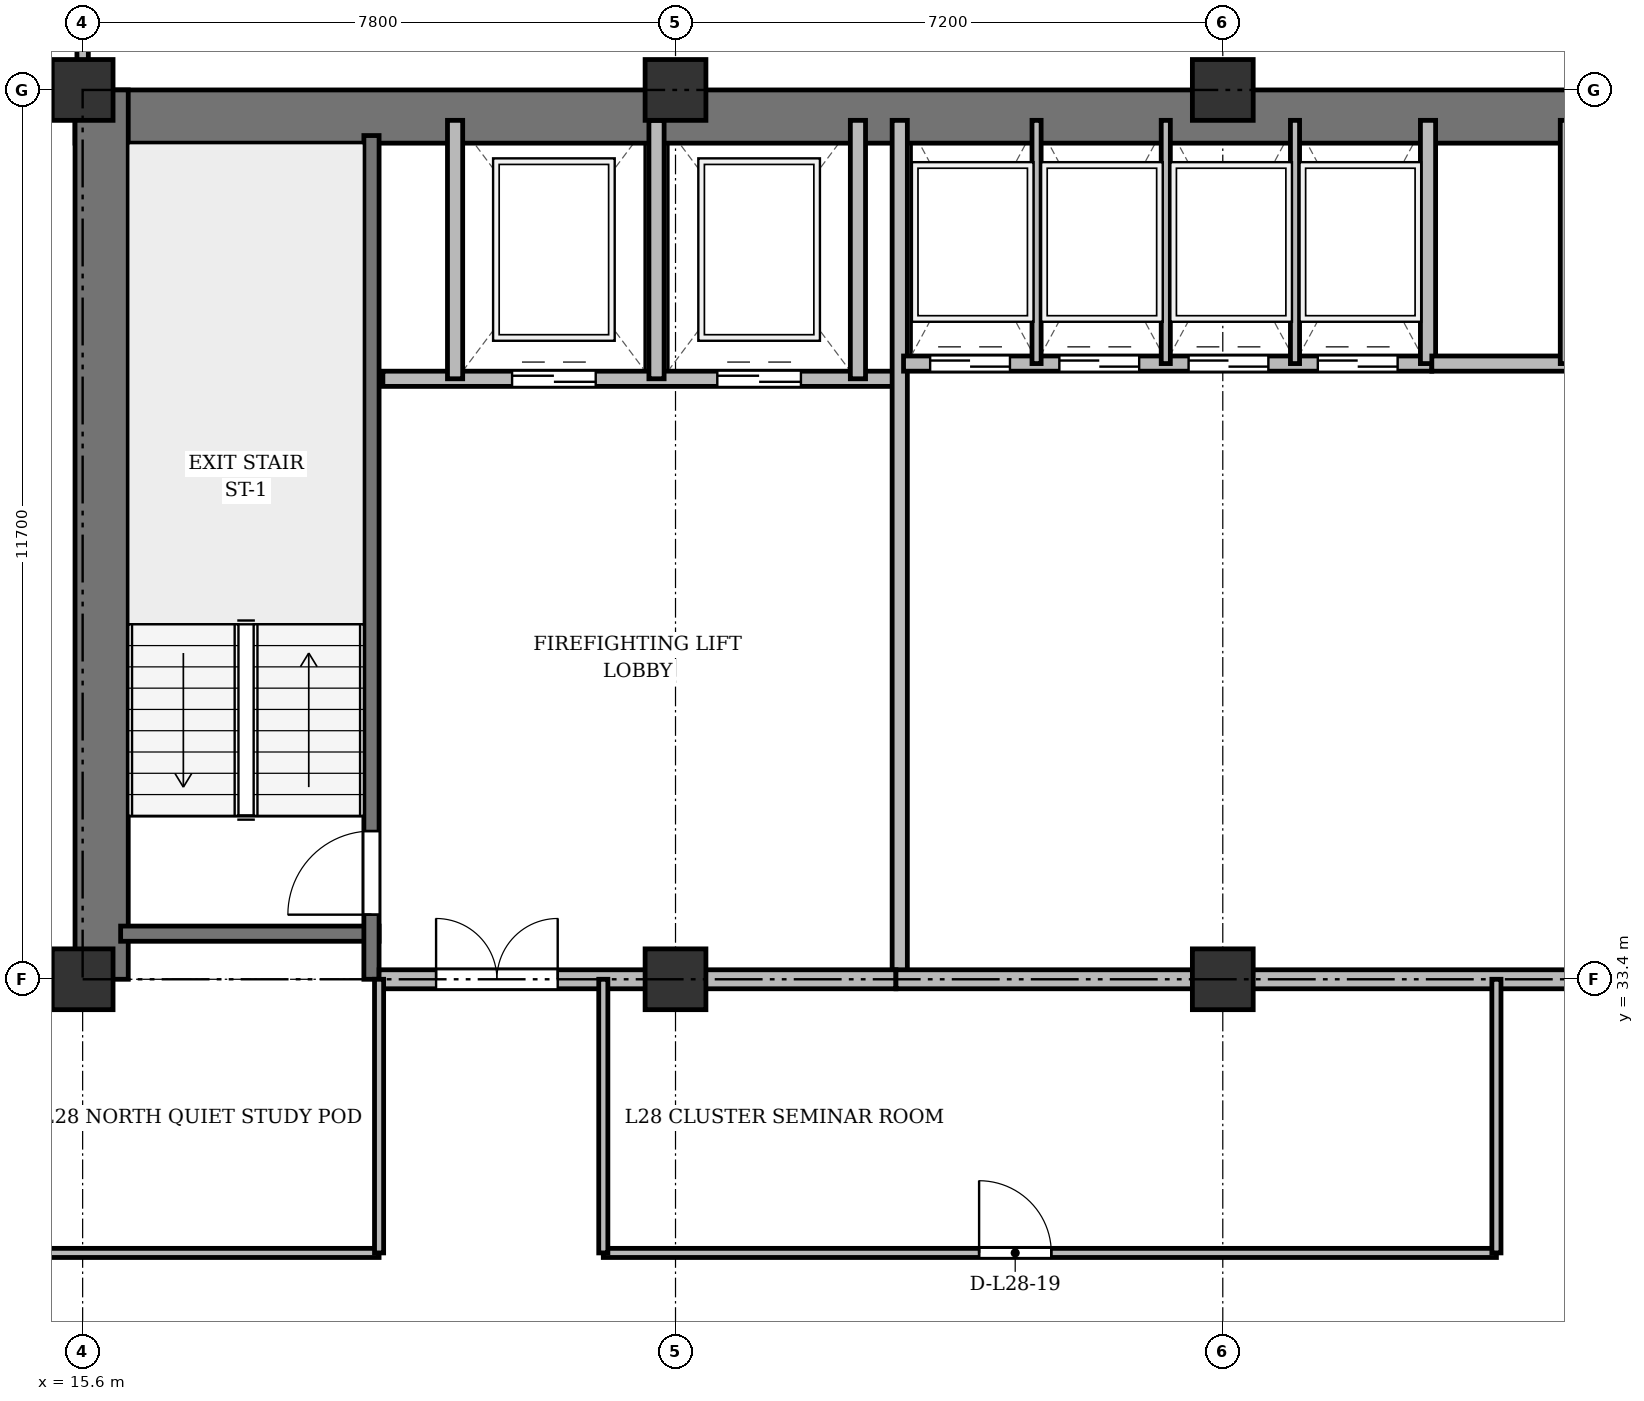
"""IFC4 building model, lengths in metres.
Left out: names, types, materials, properties, quantities, classifications, styles, units other than length and angle.
Written with IfcOpenShell. Run it as: python <this file> out.ifc"""

import sys

from ifc_helpers import new_model, si_unit, direction, frame, frame_2d, origin, origin_2d, place, context, subcontext, project, spatial, rectangle, extrude, source, transform, mapped, element, fill, save


model = new_model("IFC4")
c1 = context("Model", 3, precision=1e-05, world=origin(), true_north=direction((0.0, 1.0)))
c2 = subcontext(c1, "Body", "Model", "MODEL_VIEW")
j1 = project(units=[si_unit("LENGTHUNIT", "METRE"), si_unit("PLANEANGLEUNIT", "RADIAN")], contexts=[c1])
p1 = place(None, origin())
s1 = spatial("IfcSite", under=j1, at=p1, CompositionType="ELEMENT")
p2 = place(p1, origin())
s2 = spatial("IfcBuilding", under=s1, at=p2, CompositionType="ELEMENT")
p3 = place(p2, frame((0.0, 0.0, 110.5)))
s3 = spatial("IfcBuildingStorey", under=s2, at=p3, CompositionType="ELEMENT", Elevation=110.5)
m1 = source(origin(), c2, "Body", "SweptSolid", [
    extrude(rectangle(XDim=0.8, YDim=0.8, at=origin_2d()), origin(), (0.0, 0.0, 1.0), 3.6),
])
for number, where, z_axis, x_axis in (
    (1, (15.6, 33.4, 0.0), (0.0, 0.0, 1.0), (1.0, 0.0, 0.0)),
    (2, (15.6, 45.1, 0.0), (0.0, 0.0, 1.0), (1.0, 0.0, 0.0)),
    (3, (23.4, 33.4, 0.0), (0.0, 0.0, 1.0), (1.0, 0.0, 0.0)),
    (4, (23.4, 45.1, 0.0), (0.0, 0.0, 1.0), (1.0, 0.0, 0.0)),
    (5, (30.6, 33.4, 0.0), (0.0, 0.0, 1.0), (1.0, 0.0, 0.0)),
    (6, (30.6, 45.1, 0.0), (0.0, 0.0, 1.0), (1.0, 0.0, 0.0)),
):
    element("IfcColumn", number, at=place(p3, frame(where, z_axis=z_axis, x_axis=x_axis)), inside=s3, PredefinedType="COLUMN", context=c2, shape_type="MappedRepresentation", body=[
        mapped(m1, transform((0.0, 0.0, 0.0), x_axis=(1.0, 0.0, 0.0), y_axis=(0.0, 1.0, 0.0), z_axis=(0.0, 0.0, 1.0), scale=1.0)),
    ])
p4 = place(p3, frame((15.5, 44.75, 0.0), z_axis=(0.0, 0.0, 1.0), x_axis=(1.0, 0.0, 0.0)))
e7 = element("IfcWall", 7, at=p4, inside=s3, PredefinedType="SHEAR", context=c2, shape_type="SweptSolid", body=[
    extrude(rectangle(XDim=43.4, YDim=0.7, at=frame_2d((21.7, 0.0))), origin(), (0.0, 0.0, 1.0), 3.34),
])
p5 = place(p3, frame((15.85, 33.4, 0.0), z_axis=(0.0, 0.0, 1.0), x_axis=(0.0, 1.0, 0.0)))
e8 = element("IfcWall", 8, at=p5, inside=s3, PredefinedType="SHEAR", context=c2, shape_type="SweptSolid", body=[
    extrude(rectangle(XDim=11.7, YDim=0.7, at=frame_2d((5.85, 0.0))), origin(), (0.0, 0.0, 1.0), 3.34),
])
p6 = place(p3, frame((16.1, 34.0, 0.0), z_axis=(0.0, 0.0, 1.0), x_axis=(1.0, 0.0, 0.0)))
e9 = element("IfcWall", 9, at=p6, inside=s3, PredefinedType="SHEAR", context=c2, shape_type="SweptSolid", body=[
    extrude(rectangle(XDim=3.4, YDim=0.2, at=frame_2d((1.7, 0.0))), origin(), (0.0, 0.0, 1.0), 3.34),
])
p7 = place(p3, frame((19.4, 33.4, 0.0), z_axis=(0.0, 0.0, 1.0), x_axis=(0.0, 1.0, 0.0)))
e10 = element("IfcWall", 10, at=p7, inside=s3, PredefinedType="SHEAR", context=c2, shape_type="SweptSolid", body=[
    extrude(rectangle(XDim=11.1, YDim=0.2, at=frame_2d((5.55, 0.0))), origin(), (0.0, 0.0, 1.0), 3.34),
])
p8 = place(p7, frame((0.85, 0.0, 0.0)))
e11 = element("IfcOpeningElement", 11, at=p8, cuts=e10, PredefinedType="OPENING", context=c2, shape_type="SweptSolid", body=[
    extrude(rectangle(XDim=1.1, YDim=2.15, at=frame_2d((0.55, 1.075))), frame((0.0, 0.11, 0.0), z_axis=(0.0, -1.0, 0.0), x_axis=(1.0, 0.0, 0.0)), (0.0, 0.0, 1.0), 0.22),
])
p9 = place(p3, frame((19.55, 41.3, 0.0), z_axis=(0.0, 0.0, 1.0), x_axis=(1.0, 0.0, 0.0)))
e12 = element("IfcWall", 12, at=p9, inside=s3, PredefinedType="SOLIDWALL", context=c2, shape_type="SweptSolid", body=[
    extrude(rectangle(XDim=6.75, YDim=0.2, at=frame_2d((3.375, 0.0))), origin(), (0.0, 0.0, 1.0), 3.34),
])
p10 = place(p9, frame((1.7, 0.0, 0.0)))
e13 = element("IfcOpeningElement", 13, at=p10, cuts=e12, PredefinedType="OPENING", context=c2, shape_type="SweptSolid", body=[
    extrude(rectangle(XDim=1.1, YDim=2.15, at=frame_2d((0.55, 1.075))), frame((0.0, 0.11, 0.0), z_axis=(0.0, -1.0, 0.0), x_axis=(1.0, 0.0, 0.0)), (0.0, 0.0, 1.0), 0.22),
])
p11 = place(p9, frame((4.4, 0.0, 0.0)))
e14 = element("IfcOpeningElement", 14, at=p11, cuts=e12, PredefinedType="OPENING", context=c2, shape_type="SweptSolid", body=[
    extrude(rectangle(XDim=1.1, YDim=2.15, at=frame_2d((0.55, 1.075))), frame((0.0, 0.11, 0.0), z_axis=(0.0, -1.0, 0.0), x_axis=(1.0, 0.0, 0.0)), (0.0, 0.0, 1.0), 0.22),
])
for number, where, z_axis, x_axis in (
    (15, (20.5, 41.3, 0.0), (0.0, 0.0, 1.0), (0.0, 1.0, 0.0)),
    (16, (23.15, 41.3, 0.0), (0.0, 0.0, 1.0), (0.0, 1.0, 0.0)),
    (17, (25.8, 41.3, 0.0), (0.0, 0.0, 1.0), (0.0, 1.0, 0.0)),
):
    element("IfcWall", number, at=place(p3, frame(where, z_axis=z_axis, x_axis=x_axis)), inside=s3, PredefinedType="SOLIDWALL", context=c2, shape_type="SweptSolid", body=[
        extrude(rectangle(XDim=3.4, YDim=0.2, at=frame_2d((1.7, 0.0))), origin(), (0.0, 0.0, 1.0), 3.34),
    ])
p12 = place(p3, frame((26.35, 33.4, 0.0), z_axis=(0.0, 0.0, 1.0), x_axis=(0.0, 1.0, 0.0)))
e18 = element("IfcWall", 18, at=p12, inside=s3, PredefinedType="SOLIDWALL", context=c2, shape_type="SweptSolid", body=[
    extrude(rectangle(XDim=11.3, YDim=0.2, at=frame_2d((5.65, 0.0))), origin(), (0.0, 0.0, 1.0), 2.752),
])
p13 = place(p3, frame((19.5, 33.4, 0.0), z_axis=(0.0, 0.0, 1.0), x_axis=(1.0, 0.0, 0.0)))
e19 = element("IfcWall", 19, at=p13, inside=s3, PredefinedType="PARTITIONING", context=c2, shape_type="SweptSolid", body=[
    extrude(rectangle(XDim=6.8, YDim=0.25, at=frame_2d((3.4, 0.0))), origin(), (0.0, 0.0, 1.0), 2.752),
])
p14 = place(p13, frame((0.75, 0.0, 0.0)))
e20 = element("IfcOpeningElement", 20, at=p14, cuts=e19, PredefinedType="OPENING", context=c2, shape_type="SweptSolid", body=[
    extrude(rectangle(XDim=1.6, YDim=2.2, at=frame_2d((0.8, 1.1))), frame((0.0, 0.135, 0.0), z_axis=(0.0, -1.0, 0.0), x_axis=(1.0, 0.0, 0.0)), (0.0, 0.0, 1.0), 0.27),
])
p15 = place(p3, frame((26.4, 41.5, 0.0), z_axis=(0.0, 0.0, 1.0), x_axis=(1.0, 0.0, 0.0)))
e21 = element("IfcWall", 21, at=p15, inside=s3, PredefinedType="SOLIDWALL", context=c2, shape_type="SweptSolid", body=[
    extrude(rectangle(XDim=6.95, YDim=0.2, at=frame_2d((3.475, 0.0))), origin(), (0.0, 0.0, 1.0), 3.34),
])
p16 = place(p15, frame((0.35, 0.0, 0.0)))
e22 = element("IfcOpeningElement", 22, at=p16, cuts=e21, PredefinedType="OPENING", context=c2, shape_type="SweptSolid", body=[
    extrude(rectangle(XDim=1.05, YDim=2.15, at=frame_2d((0.525, 1.075))), frame((0.0, 0.11, 0.0), z_axis=(0.0, -1.0, 0.0), x_axis=(1.0, 0.0, 0.0)), (0.0, 0.0, 1.0), 0.22),
])
p17 = place(p15, frame((2.05, 0.0, 0.0)))
e23 = element("IfcOpeningElement", 23, at=p17, cuts=e21, PredefinedType="OPENING", context=c2, shape_type="SweptSolid", body=[
    extrude(rectangle(XDim=1.05, YDim=2.15, at=frame_2d((0.525, 1.075))), frame((0.0, 0.11, 0.0), z_axis=(0.0, -1.0, 0.0), x_axis=(1.0, 0.0, 0.0)), (0.0, 0.0, 1.0), 0.22),
])
p18 = place(p15, frame((3.75, 0.0, 0.0)))
e24 = element("IfcOpeningElement", 24, at=p18, cuts=e21, PredefinedType="OPENING", context=c2, shape_type="SweptSolid", body=[
    extrude(rectangle(XDim=1.05, YDim=2.15, at=frame_2d((0.525, 1.075))), frame((0.0, 0.11, 0.0), z_axis=(0.0, -1.0, 0.0), x_axis=(1.0, 0.0, 0.0)), (0.0, 0.0, 1.0), 0.22),
])
p19 = place(p15, frame((5.45, 0.0, 0.0)))
e25 = element("IfcOpeningElement", 25, at=p19, cuts=e21, PredefinedType="OPENING", context=c2, shape_type="SweptSolid", body=[
    extrude(rectangle(XDim=1.05, YDim=2.15, at=frame_2d((0.525, 1.075))), frame((0.0, 0.11, 0.0), z_axis=(0.0, -1.0, 0.0), x_axis=(1.0, 0.0, 0.0)), (0.0, 0.0, 1.0), 0.22),
])
p20 = place(p3, frame((33.3, 41.5, 0.0), z_axis=(0.0, 0.0, 1.0), x_axis=(0.0, 1.0, 0.0)))
e26 = element("IfcWall", 26, at=p20, inside=s3, PredefinedType="SOLIDWALL", context=c2, shape_type="SweptSolid", body=[
    extrude(rectangle(XDim=3.2, YDim=0.2, at=frame_2d((1.6, 0.0))), origin(), (0.0, 0.0, 1.0), 3.34),
])
for number, where, z_axis, x_axis in (
    (27, (28.15, 41.5, 0.0), (0.0, 0.0, 1.0), (0.0, 1.0, 0.0)),
    (28, (29.85, 41.5, 0.0), (0.0, 0.0, 1.0), (0.0, 1.0, 0.0)),
    (29, (31.55, 41.5, 0.0), (0.0, 0.0, 1.0), (0.0, 1.0, 0.0)),
):
    element("IfcWall", number, at=place(p3, frame(where, z_axis=z_axis, x_axis=x_axis)), inside=s3, PredefinedType="PARTITIONING", context=c2, shape_type="SweptSolid", body=[
        extrude(rectangle(XDim=3.2, YDim=0.12, at=frame_2d((1.6, 0.0))), origin(), (0.0, 0.0, 1.0), 3.34),
    ])
p21 = place(p3, frame((33.35, 41.5, 0.0), z_axis=(0.0, 0.0, 1.0), x_axis=(1.0, 0.0, 0.0)))
e30 = element("IfcWall", 30, at=p21, inside=s3, PredefinedType="SOLIDWALL", context=c2, shape_type="SweptSolid", body=[
    extrude(rectangle(XDim=6.9, YDim=0.2, at=frame_2d((3.45, 0.0))), origin(), (0.0, 0.0, 1.0), 3.34),
])
p22 = place(p3, frame((35.1, 41.5, 0.0), z_axis=(0.0, 0.0, 1.0), x_axis=(0.0, 1.0, 0.0)))
e31 = element("IfcWall", 31, at=p22, inside=s3, PredefinedType="PARTITIONING", context=c2, shape_type="SweptSolid", body=[
    extrude(rectangle(XDim=3.2, YDim=0.12, at=frame_2d((1.6, 0.0))), origin(), (0.0, 0.0, 1.0), 3.34),
])
p23 = place(p3, frame((26.3, 33.4, 0.0), z_axis=(0.0, 0.0, 1.0), x_axis=(1.0, 0.0, 0.0)))
e32 = element("IfcWall", 32, at=p23, inside=s3, PredefinedType="PARTITIONING", context=c2, shape_type="SweptSolid", body=[
    extrude(rectangle(XDim=20.85, YDim=0.25, at=frame_2d((10.425, 0.0))), origin(), (0.0, 0.0, 1.0), 2.752),
])
p24 = place(p23, frame((9.2, 0.0, 0.0)))
e33 = element("IfcOpeningElement", 33, at=p24, cuts=e32, PredefinedType="OPENING", context=c2, shape_type="SweptSolid", body=[
    extrude(rectangle(XDim=1.6, YDim=2.2, at=frame_2d((0.8, 1.1))), frame((0.0, 0.135, 0.0), z_axis=(0.0, -1.0, 0.0), x_axis=(1.0, 0.0, 0.0)), (0.0, 0.0, 1.0), 0.27),
])
p25 = place(p3, frame((4.75, 29.8, 0.0), z_axis=(0.0, 0.0, 1.0), x_axis=(1.0, 0.0, 0.0)))
e34 = element("IfcWall", 34, at=p25, inside=s3, PredefinedType="PARTITIONING", context=c2, shape_type="SweptSolid", body=[
    extrude(rectangle(XDim=14.75, YDim=0.12, at=frame_2d((7.375, 0.0))), origin(), (0.0, 0.0, 1.0), 2.84),
])
p26 = place(p25, frame((6.9, 0.0, 0.0)))
e35 = element("IfcOpeningElement", 35, at=p26, cuts=e34, PredefinedType="OPENING", context=c2, shape_type="SweptSolid", body=[
    extrude(rectangle(XDim=0.95, YDim=2.15, at=frame_2d((0.475, 1.075))), frame((0.0, 0.07, 0.0), z_axis=(0.0, -1.0, 0.0), x_axis=(1.0, 0.0, 0.0)), (0.0, 0.0, 1.0), 0.14),
])
p27 = place(p3, frame((22.45, 29.8, 0.0), z_axis=(0.0, 0.0, 1.0), x_axis=(1.0, 0.0, 0.0)))
e36 = element("IfcWall", 36, at=p27, inside=s3, PredefinedType="PARTITIONING", context=c2, shape_type="SweptSolid", body=[
    extrude(rectangle(XDim=11.75, YDim=0.12, at=frame_2d((5.875, 0.0))), origin(), (0.0, 0.0, 1.0), 2.84),
])
p28 = place(p27, frame((4.944, 0.0, 0.0)))
e37 = element("IfcOpeningElement", 37, at=p28, cuts=e36, PredefinedType="OPENING", context=c2, shape_type="SweptSolid", body=[
    extrude(rectangle(XDim=0.95, YDim=2.15, at=frame_2d((0.475, 1.075))), frame((0.0, 0.07, 0.0), z_axis=(0.0, -1.0, 0.0), x_axis=(1.0, 0.0, 0.0)), (0.0, 0.0, 1.0), 0.14),
])
for number, where, z_axis, x_axis in (
    (38, (19.5, 29.8, 0.0), (0.0, 0.0, 1.0), (0.0, 1.0, 0.0)),
    (39, (22.45, 29.8, 0.0), (0.0, 0.0, 1.0), (0.0, 1.0, 0.0)),
    (40, (34.2, 29.8, 0.0), (0.0, 0.0, 1.0), (0.0, 1.0, 0.0)),
):
    element("IfcWall", number, at=place(p3, frame(where, z_axis=z_axis, x_axis=x_axis)), inside=s3, PredefinedType="PARTITIONING", context=c2, shape_type="SweptSolid", body=[
        extrude(rectangle(XDim=3.6, YDim=0.12, at=frame_2d((1.8, 0.0))), origin(), (0.0, 0.0, 1.0), 2.752),
    ])
p29 = place(p3, frame((4.75, 33.4, 0.0), z_axis=(0.0, 0.0, 1.0), x_axis=(1.0, 0.0, 0.0)))
e41 = element("IfcWall", 41, at=p29, inside=s3, PredefinedType="PARTITIONING", context=c2, shape_type="SweptSolid", body=[
    extrude(rectangle(XDim=10.85, YDim=0.15, at=frame_2d((5.425, 0.0))), origin(), (0.0, 0.0, 1.0), 2.752),
])
p30 = place(p29, frame((4.94, 0.0, 0.0)))
e42 = element("IfcOpeningElement", 42, at=p30, cuts=e41, PredefinedType="OPENING", context=c2, shape_type="SweptSolid", body=[
    extrude(rectangle(XDim=0.95, YDim=2.15, at=frame_2d((0.475, 1.075))), frame((0.0, 0.085, 0.0), z_axis=(0.0, -1.0, 0.0), x_axis=(1.0, 0.0, 0.0)), (0.0, 0.0, 1.0), 0.17),
])
p31 = place(p3, frame((15.6, 44.75, 0.0), z_axis=(0.0, 0.0, 1.0), x_axis=(0.0, 1.0, 0.0)))
e43 = element("IfcWall", 43, at=p31, inside=s3, PredefinedType="PARTITIONING", context=c2, shape_type="SweptSolid", body=[
    extrude(rectangle(XDim=3.61, YDim=0.15, at=frame_2d((1.805, 0.0))), origin(), (0.0, 0.0, 1.0), 2.84),
])
p32 = place(p31, frame((1.1, 0.0, 0.0)))
e44 = element("IfcOpeningElement", 44, at=p32, cuts=e43, PredefinedType="OPENING", context=c2, shape_type="SweptSolid", body=[
    extrude(rectangle(XDim=0.95, YDim=2.15, at=frame_2d((0.475, 1.075))), frame((0.0, 0.085, 0.0), z_axis=(0.0, -1.0, 0.0), x_axis=(1.0, 0.0, 0.0)), (0.0, 0.0, 1.0), 0.17),
])
m2 = source(origin(), c2, "Body", "SweptSolid", [
    extrude(rectangle(XDim=1.1, YDim=2.15, at=frame_2d((0.55, 1.075))), frame((0.0, 0.025, 0.0), z_axis=(0.0, -1.0, 0.0), x_axis=(1.0, 0.0, 0.0)), (0.0, 0.0, 1.0), 0.05),
])
p33 = place(p8, origin())
e45 = element("IfcDoor", 45, at=p33, inside=s3, OperationType="SINGLE_SWING_LEFT", PredefinedType="DOOR", context=c2, shape_type="MappedRepresentation", body=[
    mapped(m2, transform((0.0, 0.0, 0.0), x_axis=(1.0, 0.0, 0.0), y_axis=(0.0, 1.0, 0.0), z_axis=(0.0, 0.0, 1.0), scale=1.0)),
])
fill(e11, e45)
p34 = place(p10, origin())
e46 = element("IfcDoor", 46, at=p34, inside=s3, OperationType="DOUBLE_DOOR_SLIDING", PredefinedType="DOOR", context=c2, shape_type="MappedRepresentation", body=[
    mapped(m2, transform((0.0, 0.0, 0.0), x_axis=(1.0, 0.0, 0.0), y_axis=(0.0, 1.0, 0.0), z_axis=(0.0, 0.0, 1.0), scale=1.0)),
])
fill(e13, e46)
p35 = place(p11, origin())
e47 = element("IfcDoor", 47, at=p35, inside=s3, OperationType="DOUBLE_DOOR_SLIDING", PredefinedType="DOOR", context=c2, shape_type="MappedRepresentation", body=[
    mapped(m2, transform((0.0, 0.0, 0.0), x_axis=(1.0, 0.0, 0.0), y_axis=(0.0, 1.0, 0.0), z_axis=(0.0, 0.0, 1.0), scale=1.0)),
])
fill(e14, e47)
m3 = source(origin(), c2, "Body", "SweptSolid", [
    extrude(rectangle(XDim=1.6, YDim=2.2, at=frame_2d((0.8, 1.1))), frame((0.0, 0.025, 0.0), z_axis=(0.0, -1.0, 0.0), x_axis=(1.0, 0.0, 0.0)), (0.0, 0.0, 1.0), 0.05),
])
p36 = place(p14, origin())
e48 = element("IfcDoor", 48, at=p36, inside=s3, OperationType="DOUBLE_DOOR_SINGLE_SWING", PredefinedType="DOOR", context=c2, shape_type="MappedRepresentation", body=[
    mapped(m3, transform((0.0, 0.0, 0.0), x_axis=(1.0, 0.0, 0.0), y_axis=(0.0, 1.0, 0.0), z_axis=(0.0, 0.0, 1.0), scale=1.0)),
])
fill(e20, e48)
m4 = source(origin(), c2, "Body", "SweptSolid", [
    extrude(rectangle(XDim=1.05, YDim=2.15, at=frame_2d((0.525, 1.075))), frame((0.0, 0.025, 0.0), z_axis=(0.0, -1.0, 0.0), x_axis=(1.0, 0.0, 0.0)), (0.0, 0.0, 1.0), 0.05),
])
p37 = place(p16, origin())
e49 = element("IfcDoor", 49, at=p37, inside=s3, OperationType="DOUBLE_DOOR_SLIDING", PredefinedType="DOOR", context=c2, shape_type="MappedRepresentation", body=[
    mapped(m4, transform((0.0, 0.0, 0.0), x_axis=(1.0, 0.0, 0.0), y_axis=(0.0, 1.0, 0.0), z_axis=(0.0, 0.0, 1.0), scale=1.0)),
])
fill(e22, e49)
p38 = place(p17, origin())
e50 = element("IfcDoor", 50, at=p38, inside=s3, OperationType="DOUBLE_DOOR_SLIDING", PredefinedType="DOOR", context=c2, shape_type="MappedRepresentation", body=[
    mapped(m4, transform((0.0, 0.0, 0.0), x_axis=(1.0, 0.0, 0.0), y_axis=(0.0, 1.0, 0.0), z_axis=(0.0, 0.0, 1.0), scale=1.0)),
])
fill(e23, e50)
p39 = place(p18, origin())
e51 = element("IfcDoor", 51, at=p39, inside=s3, OperationType="DOUBLE_DOOR_SLIDING", PredefinedType="DOOR", context=c2, shape_type="MappedRepresentation", body=[
    mapped(m4, transform((0.0, 0.0, 0.0), x_axis=(1.0, 0.0, 0.0), y_axis=(0.0, 1.0, 0.0), z_axis=(0.0, 0.0, 1.0), scale=1.0)),
])
fill(e24, e51)
p40 = place(p19, origin())
e52 = element("IfcDoor", 52, at=p40, inside=s3, OperationType="DOUBLE_DOOR_SLIDING", PredefinedType="DOOR", context=c2, shape_type="MappedRepresentation", body=[
    mapped(m4, transform((0.0, 0.0, 0.0), x_axis=(1.0, 0.0, 0.0), y_axis=(0.0, 1.0, 0.0), z_axis=(0.0, 0.0, 1.0), scale=1.0)),
])
fill(e25, e52)
m5 = source(origin(), c2, "Body", "SweptSolid", [
    extrude(rectangle(XDim=0.95, YDim=2.15, at=frame_2d((0.475, 1.075))), frame((0.0, 0.025, 0.0), z_axis=(0.0, -1.0, 0.0), x_axis=(1.0, 0.0, 0.0)), (0.0, 0.0, 1.0), 0.05),
])
p41 = place(p28, origin())
e53 = element("IfcDoor", 53, at=p41, inside=s3, OperationType="SINGLE_SWING_LEFT", PredefinedType="DOOR", context=c2, shape_type="MappedRepresentation", body=[
    mapped(m5, transform((0.0, 0.0, 0.0), x_axis=(1.0, 0.0, 0.0), y_axis=(0.0, 1.0, 0.0), z_axis=(0.0, 0.0, 1.0), scale=1.0)),
])
fill(e37, e53)
save(model, sys.argv[1])
